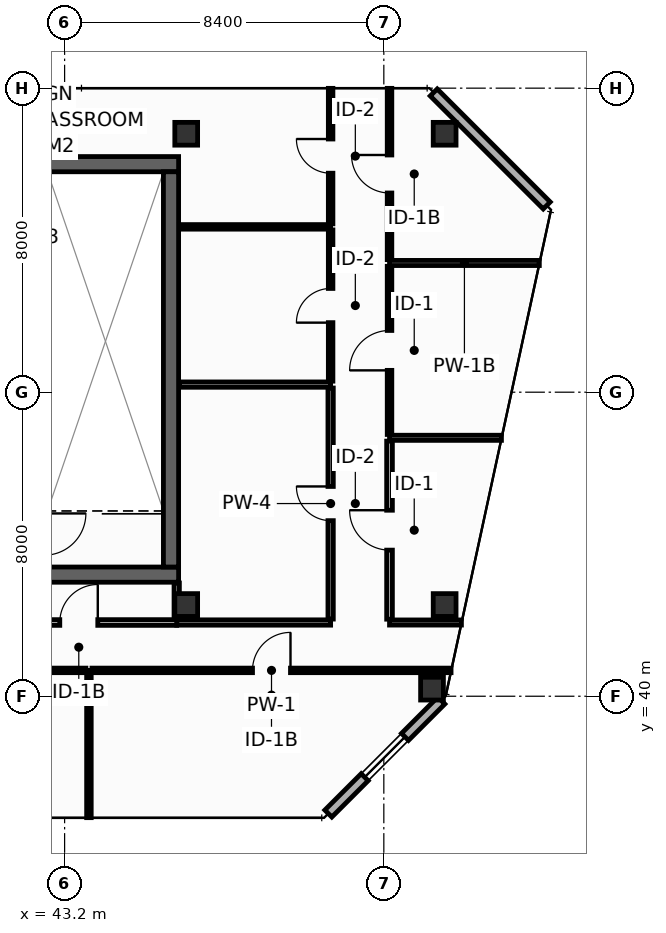
"""IFC4 building model, lengths in metres.
Left out: names, types, materials, properties, quantities, classifications, styles, units other than length and angle.
Written with IfcOpenShell. Run it as: python <this file> out.ifc"""

import sys

from ifc_helpers import new_model, si_unit, direction, frame, frame_2d, origin, origin_2d, place, context, subcontext, project, spatial, rectangle, hollow_rectangle, extrude, element, fill, save


model = new_model("IFC4")
c1 = context("Model", 3, precision=1e-05, world=origin(), true_north=direction((0.0, 1.0)))
c2 = subcontext(c1, "Body", "Model", "MODEL_VIEW")
j1 = project(units=[si_unit("LENGTHUNIT", "METRE"), si_unit("PLANEANGLEUNIT", "RADIAN")], contexts=[c1])
p1 = place(None, origin())
s1 = spatial("IfcSite", under=j1, at=p1, CompositionType="ELEMENT")
p2 = place(p1, origin())
s2 = spatial("IfcBuilding", under=s1, at=p2, CompositionType="ELEMENT")
p3 = place(p2, frame((0.0, 0.0, 323.4)))
s3 = spatial("IfcBuildingStorey", under=s2, at=p3, CompositionType="ELEMENT", Elevation=323.4)
p4 = place(p3, frame((13.7, 43.2, 0.0), z_axis=(0.0, 0.0, 1.0), x_axis=(1.0, 0.0, 0.0)))
e1 = element("IfcWall", 1, at=p4, inside=s3, PredefinedType="SHEAR", context=c2, shape_type="SweptSolid", body=[
    extrude(rectangle(XDim=32.5, YDim=0.4, at=frame_2d((16.25, 0.0))), origin(), (0.0, 0.0, 1.0), 3.9),
])
p5 = place(p4, frame((5.4, 0.0, 0.0)))
e2 = element("IfcOpeningElement", 2, at=p5, cuts=e1, PredefinedType="OPENING", context=c2, shape_type="SweptSolid", body=[
    extrude(rectangle(XDim=1.1, YDim=2.15, at=frame_2d((0.55, 1.075))), frame((0.0, 0.21, 0.0), z_axis=(0.0, -1.0, 0.0), x_axis=(1.0, 0.0, 0.0)), (0.0, 0.0, 1.0), 0.42),
])
p6 = place(p4, frame((25.6, 0.0, 0.0)))
e3 = element("IfcOpeningElement", 3, at=p6, cuts=e1, PredefinedType="OPENING", context=c2, shape_type="SweptSolid", body=[
    extrude(rectangle(XDim=1.1, YDim=2.15, at=frame_2d((0.55, 1.075))), frame((0.0, 0.21, 0.0), z_axis=(0.0, -1.0, 0.0), x_axis=(1.0, 0.0, 0.0)), (0.0, 0.0, 1.0), 0.42),
])
p7 = place(p3, frame((13.7, 54.0, 0.0), z_axis=(0.0, 0.0, 1.0), x_axis=(1.0, 0.0, 0.0)))
e4 = element("IfcWall", 4, at=p7, inside=s3, PredefinedType="SHEAR", context=c2, shape_type="SweptSolid", body=[
    extrude(rectangle(XDim=32.5, YDim=0.4, at=frame_2d((16.25, 0.0))), origin(), (0.0, 0.0, 1.0), 3.9),
])
p8 = place(p3, frame((46.0, 43.4, 0.0), z_axis=(0.0, 0.0, 1.0), x_axis=(0.0, 1.0, 0.0)))
e5 = element("IfcWall", 5, at=p8, inside=s3, PredefinedType="SHEAR", context=c2, shape_type="SweptSolid", body=[
    extrude(rectangle(XDim=10.4, YDim=0.4, at=frame_2d((5.2, 0.0))), origin(), (0.0, 0.0, 1.0), 3.9),
])
for number, where, z_axis, x_axis in (
    (6, (46.4, 54.8, 0.0), (0.0, 0.0, 1.0), (1.0, 0.0, 0.0)),
    (7, (53.2, 54.8, 0.0), (0.0, 0.0, 1.0), (1.0, 0.0, 0.0)),
    (8, (46.4, 42.4, 0.0), (0.0, 0.0, 1.0), (1.0, 0.0, 0.0)),
    (9, (53.2, 42.4, 0.0), (0.0, 0.0, 1.0), (1.0, 0.0, 0.0)),
    (10, (52.868, 40.2, 0.0), (0.0, 0.0, 1.0), (1.0, 0.0, 0.0)),
):
    element("IfcColumn", number, at=place(p3, frame(where, z_axis=z_axis, x_axis=x_axis)), inside=s3, PredefinedType="COLUMN", context=c2, shape_type="SweptSolid", body=[
        extrude(hollow_rectangle(XDim=0.6, YDim=0.6, WallThickness=0.028, at=origin_2d()), origin(), (0.0, 0.0, 1.0), 4.2),
    ])
p9 = place(p3, frame((50.14, 36.913, 0.0), z_axis=(0.0, 0.0, 1.0), x_axis=(0.70707775441, 0.707135806771, 0.0)))
e11 = element("IfcWall", 11, at=p9, inside=s3, PredefinedType="STANDARD", context=c2, shape_type="SweptSolid", body=[
    extrude(rectangle(XDim=4.206, YDim=0.26, at=frame_2d((2.103, 0.0))), origin(), (0.0, 0.0, 1.0), 3.9),
])
p10 = place(p9, frame((1.353, 0.0, 0.9)))
e12 = element("IfcOpeningElement", 12, at=p10, cuts=e11, PredefinedType="OPENING", context=c2, shape_type="SweptSolid", body=[
    extrude(rectangle(XDim=1.5, YDim=1.85, at=frame_2d((0.75, 0.925))), frame((0.0, 0.14, 0.0), z_axis=(0.0, -1.0, 0.0), x_axis=(1.0, 0.0, 0.0)), (0.0, 0.0, 1.0), 0.28),
])
p11 = place(p3, frame((55.887, 52.913, 0.0), z_axis=(0.0, 0.0, 1.0), x_axis=(-0.707106781187, 0.707106781187, 0.0)))
e13 = element("IfcWall", 13, at=p11, inside=s3, PredefinedType="STANDARD", context=c2, shape_type="SweptSolid", body=[
    extrude(rectangle(XDim=4.206, YDim=0.26, at=frame_2d((2.103, 0.0))), origin(), (0.0, 0.0, 1.0), 3.9),
])
p12 = place(p3, frame((46.15, 41.94, 0.0), z_axis=(0.0, 0.0, 1.0), x_axis=(1.0, 0.0, 0.0)))
e14 = element("IfcWall", 14, at=p12, inside=s3, PredefinedType="PARTITIONING", context=c2, shape_type="SweptSolid", body=[
    extrude(rectangle(XDim=4.05, YDim=0.14, at=frame_2d((2.025, 0.0))), origin(), (0.0, 0.0, 1.0), 3.9),
])
p13 = place(p3, frame((46.15, 42.03, 0.0), z_axis=(0.0, 0.0, 1.0), x_axis=(0.0, 1.0, 0.0)))
e15 = element("IfcWall", 15, at=p13, inside=s3, PredefinedType="PARTITIONING", context=c2, shape_type="SweptSolid", body=[
    extrude(rectangle(XDim=0.95, YDim=0.14, at=frame_2d((0.475, 0.0))), origin(), (0.0, 0.0, 1.0), 3.9),
])
p14 = place(p3, frame((46.22, 48.2, 0.0), z_axis=(0.0, 0.0, 1.0), x_axis=(1.0, 0.0, 0.0)))
e16 = element("IfcWall", 16, at=p14, inside=s3, PredefinedType="PARTITIONING", context=c2, shape_type="SweptSolid", body=[
    extrude(rectangle(XDim=3.98, YDim=0.14, at=frame_2d((1.99, 0.0))), origin(), (0.0, 0.0, 1.0), 3.9),
])
p15 = place(p3, frame((50.2, 42.03, 0.0), z_axis=(0.0, 0.0, 1.0), x_axis=(0.0, 1.0, 0.0)))
e17 = element("IfcWall", 17, at=p15, inside=s3, PredefinedType="PARTITIONING", context=c2, shape_type="SweptSolid", body=[
    extrude(rectangle(XDim=6.08, YDim=0.14, at=frame_2d((3.04, 0.0))), origin(), (0.0, 0.0, 1.0), 3.297),
])
p16 = place(p15, frame((2.59, 0.0, 0.0)))
e18 = element("IfcOpeningElement", 18, at=p16, cuts=e17, PredefinedType="OPENING", context=c2, shape_type="SweptSolid", body=[
    extrude(rectangle(XDim=0.9, YDim=2.1, at=frame_2d((0.45, 1.05))), frame((0.0, 0.08, 0.0), z_axis=(0.0, -1.0, 0.0), x_axis=(1.0, 0.0, 0.0)), (0.0, 0.0, 1.0), 0.16),
])
p17 = place(p3, frame((46.22, 52.35, 0.0), z_axis=(0.0, 0.0, 1.0), x_axis=(1.0, 0.0, 0.0)))
e19 = element("IfcWall", 19, at=p17, inside=s3, PredefinedType="PARTITIONING", context=c2, shape_type="SweptSolid", body=[
    extrude(rectangle(XDim=3.98, YDim=0.12, at=frame_2d((1.99, 0.0))), origin(), (0.0, 0.0, 1.0), 3.9),
])
p18 = place(p3, frame((50.2, 48.29, 0.0), z_axis=(0.0, 0.0, 1.0), x_axis=(0.0, 1.0, 0.0)))
e20 = element("IfcWall", 20, at=p18, inside=s3, PredefinedType="PARTITIONING", context=c2, shape_type="SweptSolid", body=[
    extrude(rectangle(XDim=3.98, YDim=0.12, at=frame_2d((1.99, 0.0))), origin(), (0.0, 0.0, 1.0), 3.9),
])
p19 = place(p18, frame((1.54, 0.0, 0.0)))
e21 = element("IfcOpeningElement", 21, at=p19, cuts=e20, PredefinedType="OPENING", context=c2, shape_type="SweptSolid", body=[
    extrude(rectangle(XDim=0.9, YDim=2.1, at=frame_2d((0.45, 1.05))), frame((0.0, 0.07, 0.0), z_axis=(0.0, -1.0, 0.0), x_axis=(1.0, 0.0, 0.0)), (0.0, 0.0, 1.0), 0.14),
])
p20 = place(p3, frame((50.2, 52.43, 0.0), z_axis=(0.0, 0.0, 1.0), x_axis=(0.0, 1.0, 0.0)))
e22 = element("IfcWall", 22, at=p20, inside=s3, PredefinedType="PARTITIONING", context=c2, shape_type="SweptSolid", body=[
    extrude(rectangle(XDim=3.565, YDim=0.12, at=frame_2d((1.783, 0.0))), origin(), (0.0, 0.0, 1.0), 3.285),
])
p21 = place(p20, frame((1.332, 0.0, 0.0)))
e23 = element("IfcOpeningElement", 23, at=p21, cuts=e22, PredefinedType="OPENING", context=c2, shape_type="SweptSolid", body=[
    extrude(rectangle(XDim=0.9, YDim=2.1, at=frame_2d((0.45, 1.05))), frame((0.0, 0.07, 0.0), z_axis=(0.0, -1.0, 0.0), x_axis=(1.0, 0.0, 0.0)), (0.0, 0.0, 1.0), 0.14),
])
p22 = place(p3, frame((51.75, 41.94, 0.0), z_axis=(0.0, 0.0, 1.0), x_axis=(1.0, 0.0, 0.0)))
e24 = element("IfcWall", 24, at=p22, inside=s3, PredefinedType="PARTITIONING", context=c2, shape_type="SweptSolid", body=[
    extrude(rectangle(XDim=1.892, YDim=0.135, at=frame_2d((0.946, 0.0))), origin(), (0.0, 0.0, 1.0), 3.435),
])
p23 = place(p3, frame((51.75, 46.8, 0.0), z_axis=(0.0, 0.0, 1.0), x_axis=(1.0, 0.0, 0.0)))
e25 = element("IfcWall", 25, at=p23, inside=s3, PredefinedType="PARTITIONING", context=c2, shape_type="SweptSolid", body=[
    extrude(rectangle(XDim=2.945, YDim=0.135, at=frame_2d((1.472, 0.0))), origin(), (0.0, 0.0, 1.0), 3.297),
])
p24 = place(p3, frame((51.75, 51.4, 0.0), z_axis=(0.0, 0.0, 1.0), x_axis=(1.0, 0.0, 0.0)))
e26 = element("IfcWall", 26, at=p24, inside=s3, PredefinedType="PARTITIONING", context=c2, shape_type="SweptSolid", body=[
    extrude(rectangle(XDim=3.942, YDim=0.135, at=frame_2d((1.971, 0.0))), origin(), (0.0, 0.0, 1.0), 3.297),
])
p25 = place(p3, frame((51.75, 42.028, 0.0), z_axis=(0.0, 0.0, 1.0), x_axis=(0.0, 1.0, 0.0)))
e27 = element("IfcWall", 27, at=p25, inside=s3, PredefinedType="PARTITIONING", context=c2, shape_type="SweptSolid", body=[
    extrude(rectangle(XDim=4.685, YDim=0.15, at=frame_2d((2.342, 0.0))), origin(), (0.0, 0.0, 1.0), 3.297),
])
p26 = place(p25, frame((1.817, 0.0, 0.0)))
e28 = element("IfcOpeningElement", 28, at=p26, cuts=e27, PredefinedType="OPENING", context=c2, shape_type="SweptSolid", body=[
    extrude(rectangle(XDim=1.05, YDim=2.15, at=frame_2d((0.525, 1.075))), frame((0.0, 0.085, 0.0), z_axis=(0.0, -1.0, 0.0), x_axis=(1.0, 0.0, 0.0)), (0.0, 0.0, 1.0), 0.17),
])
p27 = place(p3, frame((51.75, 46.887, 0.0), z_axis=(0.0, 0.0, 1.0), x_axis=(0.0, 1.0, 0.0)))
e29 = element("IfcWall", 29, at=p27, inside=s3, PredefinedType="PARTITIONING", context=c2, shape_type="SweptSolid", body=[
    extrude(rectangle(XDim=4.425, YDim=0.12, at=frame_2d((2.212, 0.0))), origin(), (0.0, 0.0, 1.0), 3.9),
])
p28 = place(p27, frame((1.687, 0.0, 0.0)))
e30 = element("IfcOpeningElement", 30, at=p28, cuts=e29, PredefinedType="OPENING", context=c2, shape_type="SweptSolid", body=[
    extrude(rectangle(XDim=1.05, YDim=2.15, at=frame_2d((0.525, 1.075))), frame((0.0, 0.07, 0.0), z_axis=(0.0, -1.0, 0.0), x_axis=(1.0, 0.0, 0.0)), (0.0, 0.0, 1.0), 0.14),
])
p29 = place(p3, frame((51.75, 51.488, 0.0), z_axis=(0.0, 0.0, 1.0), x_axis=(0.0, 1.0, 0.0)))
e31 = element("IfcWall", 31, at=p29, inside=s3, PredefinedType="PARTITIONING", context=c2, shape_type="SweptSolid", body=[
    extrude(rectangle(XDim=4.508, YDim=0.12, at=frame_2d((2.254, 0.0))), origin(), (0.0, 0.0, 1.0), 3.285),
])
p30 = place(p29, frame((1.754, 0.0, 0.0)))
e32 = element("IfcOpeningElement", 32, at=p30, cuts=e31, PredefinedType="OPENING", context=c2, shape_type="SweptSolid", body=[
    extrude(rectangle(XDim=1.0, YDim=2.15, at=frame_2d((0.5, 1.075))), frame((0.0, 0.07, 0.0), z_axis=(0.0, -1.0, 0.0), x_axis=(1.0, 0.0, 0.0)), (0.0, 0.0, 1.0), 0.14),
])
p31 = place(p3, frame((40.995, 41.94, 0.0), z_axis=(0.0, 0.0, 1.0), x_axis=(1.0, 0.0, 0.0)))
e33 = element("IfcWall", 33, at=p31, inside=s3, PredefinedType="PARTITIONING", context=c2, shape_type="SweptSolid", body=[
    extrude(rectangle(XDim=5.155, YDim=0.15, at=frame_2d((2.577, 0.0))), origin(), (0.0, 0.0, 1.0), 3.9),
])
p32 = place(p31, frame((2.078, 0.0, 0.0)))
e34 = element("IfcOpeningElement", 34, at=p32, cuts=e33, PredefinedType="OPENING", context=c2, shape_type="SweptSolid", body=[
    extrude(rectangle(XDim=1.0, YDim=2.15, at=frame_2d((0.5, 1.075))), frame((0.0, 0.085, 0.0), z_axis=(0.0, -1.0, 0.0), x_axis=(1.0, 0.0, 0.0)), (0.0, 0.0, 1.0), 0.17),
])
p33 = place(p3, frame((43.84, 36.805, 0.0), z_axis=(0.0, 0.0, 1.0), x_axis=(0.0, 1.0, 0.0)))
e35 = element("IfcWall", 35, at=p33, inside=s3, PredefinedType="PARTITIONING", context=c2, shape_type="SweptSolid", body=[
    extrude(rectangle(XDim=3.875, YDim=0.12, at=frame_2d((1.938, 0.0))), origin(), (0.0, 0.0, 1.0), 3.9),
])
p34 = place(p3, frame((36.067, 40.68, 0.0), z_axis=(0.0, 0.0, 1.0), x_axis=(1.0, 0.0, 0.0)))
e36 = element("IfcWall", 36, at=p34, inside=s3, PredefinedType="PARTITIONING", context=c2, shape_type="SweptSolid", body=[
    extrude(rectangle(XDim=7.693, YDim=0.12, at=frame_2d((3.846, 0.0))), origin(), (0.0, 0.0, 1.0), 3.9),
])
p35 = place(p34, frame((3.321, 0.0, 0.0)))
e37 = element("IfcOpeningElement", 37, at=p35, cuts=e36, PredefinedType="OPENING", context=c2, shape_type="SweptSolid", body=[
    extrude(rectangle(XDim=1.05, YDim=2.15, at=frame_2d((0.525, 1.075))), frame((0.0, 0.07, 0.0), z_axis=(0.0, -1.0, 0.0), x_axis=(1.0, 0.0, 0.0)), (0.0, 0.0, 1.0), 0.14),
])
p36 = place(p3, frame((43.92, 40.68, 0.0), z_axis=(0.0, 0.0, 1.0), x_axis=(1.0, 0.0, 0.0)))
e38 = element("IfcWall", 38, at=p36, inside=s3, PredefinedType="PARTITIONING", context=c2, shape_type="SweptSolid", body=[
    extrude(rectangle(XDim=9.449, YDim=0.12, at=frame_2d((4.725, 0.0))), origin(), (0.0, 0.0, 1.0), 3.435),
])
p37 = place(p36, frame((4.224, 0.0, 0.0)))
e39 = element("IfcOpeningElement", 39, at=p37, cuts=e38, PredefinedType="OPENING", context=c2, shape_type="SweptSolid", body=[
    extrude(rectangle(XDim=1.0, YDim=2.15, at=frame_2d((0.5, 1.075))), frame((0.0, 0.07, 0.0), z_axis=(0.0, -1.0, 0.0), x_axis=(1.0, 0.0, 0.0)), (0.0, 0.0, 1.0), 0.14),
])
p38 = place(p10, origin())
e40 = element("IfcWindow", 40, at=p38, inside=s3, PartitioningType="SINGLE_PANEL", PredefinedType="WINDOW", context=c2, shape_type="SweptSolid", body=[
    extrude(rectangle(XDim=1.5, YDim=1.85, at=frame_2d((0.75, 0.925))), frame((0.0, 0.03, 0.0), z_axis=(0.0, -1.0, 0.0), x_axis=(1.0, 0.0, 0.0)), (0.0, 0.0, 1.0), 0.06),
])
fill(e12, e40)
p39 = place(p16, origin())
e41 = element("IfcDoor", 41, at=p39, inside=s3, OperationType="SINGLE_SWING_RIGHT", PredefinedType="DOOR", context=c2, shape_type="SweptSolid", body=[
    extrude(rectangle(XDim=0.9, YDim=2.1, at=frame_2d((0.45, 1.05))), frame((0.0, 0.025, 0.0), z_axis=(0.0, -1.0, 0.0), x_axis=(1.0, 0.0, 0.0)), (0.0, 0.0, 1.0), 0.05),
])
fill(e18, e41)
p40 = place(p19, origin())
e42 = element("IfcDoor", 42, at=p40, inside=s3, OperationType="SINGLE_SWING_LEFT", PredefinedType="DOOR", context=c2, shape_type="SweptSolid", body=[
    extrude(rectangle(XDim=0.9, YDim=2.1, at=frame_2d((0.45, 1.05))), frame((0.0, 0.025, 0.0), z_axis=(0.0, -1.0, 0.0), x_axis=(1.0, 0.0, 0.0)), (0.0, 0.0, 1.0), 0.05),
])
fill(e21, e42)
p41 = place(p21, origin())
e43 = element("IfcDoor", 43, at=p41, inside=s3, OperationType="SINGLE_SWING_RIGHT", PredefinedType="DOOR", context=c2, shape_type="SweptSolid", body=[
    extrude(rectangle(XDim=0.9, YDim=2.1, at=frame_2d((0.45, 1.05))), frame((0.0, 0.025, 0.0), z_axis=(0.0, -1.0, 0.0), x_axis=(1.0, 0.0, 0.0)), (0.0, 0.0, 1.0), 0.05),
])
fill(e23, e43)
p42 = place(p26, origin())
e44 = element("IfcDoor", 44, at=p42, inside=s3, OperationType="SINGLE_SWING_RIGHT", PredefinedType="DOOR", context=c2, shape_type="SweptSolid", body=[
    extrude(rectangle(XDim=1.05, YDim=2.15, at=frame_2d((0.525, 1.075))), frame((0.0, 0.025, 0.0), z_axis=(0.0, -1.0, 0.0), x_axis=(1.0, 0.0, 0.0)), (0.0, 0.0, 1.0), 0.05),
])
fill(e28, e44)
p43 = place(p28, origin())
e45 = element("IfcDoor", 45, at=p43, inside=s3, OperationType="SINGLE_SWING_LEFT", PredefinedType="DOOR", context=c2, shape_type="SweptSolid", body=[
    extrude(rectangle(XDim=1.05, YDim=2.15, at=frame_2d((0.525, 1.075))), frame((0.0, 0.025, 0.0), z_axis=(0.0, -1.0, 0.0), x_axis=(1.0, 0.0, 0.0)), (0.0, 0.0, 1.0), 0.05),
])
fill(e30, e45)
p44 = place(p30, origin())
e46 = element("IfcDoor", 46, at=p44, inside=s3, OperationType="SINGLE_SWING_RIGHT", PredefinedType="DOOR", context=c2, shape_type="SweptSolid", body=[
    extrude(rectangle(XDim=1.0, YDim=2.15, at=frame_2d((0.5, 1.075))), frame((0.0, 0.025, 0.0), z_axis=(0.0, -1.0, 0.0), x_axis=(1.0, 0.0, 0.0)), (0.0, 0.0, 1.0), 0.05),
])
fill(e32, e46)
p45 = place(p32, origin())
e47 = element("IfcDoor", 47, at=p45, inside=s3, OperationType="SINGLE_SWING_RIGHT", PredefinedType="DOOR", context=c2, shape_type="SweptSolid", body=[
    extrude(rectangle(XDim=1.0, YDim=2.15, at=frame_2d((0.5, 1.075))), frame((0.0, 0.025, 0.0), z_axis=(0.0, -1.0, 0.0), x_axis=(1.0, 0.0, 0.0)), (0.0, 0.0, 1.0), 0.05),
])
fill(e34, e47)
p46 = place(p37, origin())
e48 = element("IfcDoor", 48, at=p46, inside=s3, OperationType="SINGLE_SWING_RIGHT", PredefinedType="DOOR", context=c2, shape_type="SweptSolid", body=[
    extrude(rectangle(XDim=1.0, YDim=2.15, at=frame_2d((0.5, 1.075))), frame((0.0, 0.025, 0.0), z_axis=(0.0, -1.0, 0.0), x_axis=(1.0, 0.0, 0.0)), (0.0, 0.0, 1.0), 0.05),
])
fill(e39, e48)
save(model, sys.argv[1])
